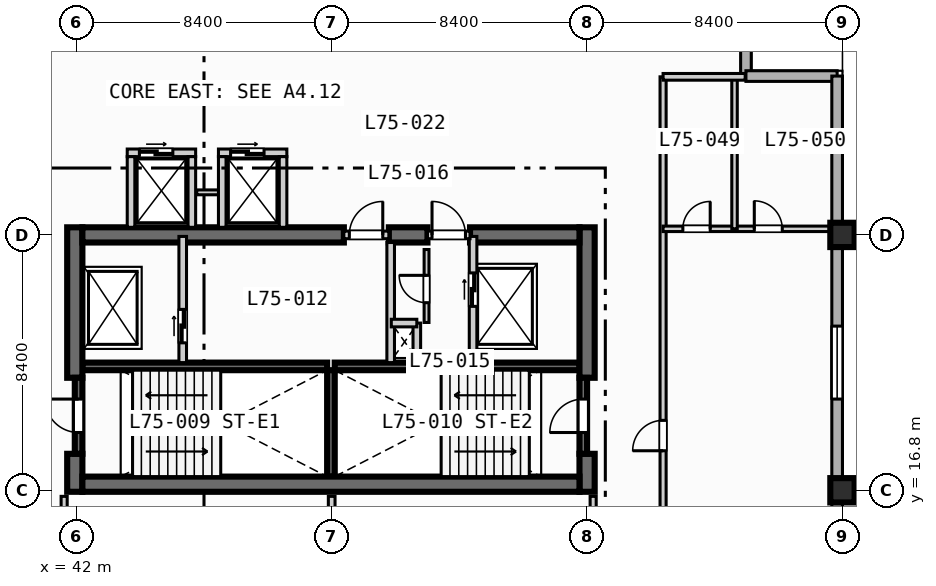
"""IFC4 building model, lengths in metres.
Left out: names, types, materials, properties, quantities, classifications, styles, units other than length and angle.
Written with IfcOpenShell. Run it as: python <this file> out.ifc"""

import sys

from ifc_helpers import new_model, si_unit, direction, frame, frame_2d, origin, origin_2d, place, context, subcontext, project, spatial, rectangle, extrude, element, fill, save


model = new_model("IFC4")
c1 = context("Model", 3, precision=1e-05, world=origin(), true_north=direction((0.0, 1.0)))
c2 = subcontext(c1, "Body", "Model", "MODEL_VIEW")
j1 = project(units=[si_unit("LENGTHUNIT", "METRE"), si_unit("PLANEANGLEUNIT", "RADIAN")], contexts=[c1])
p1 = place(None, origin())
s1 = spatial("IfcSite", under=j1, at=p1, CompositionType="ELEMENT")
p2 = place(p1, origin())
s2 = spatial("IfcBuilding", under=s1, at=p2, CompositionType="ELEMENT")
p3 = place(p2, frame((0.0, 0.0, 304.7)))
s3 = spatial("IfcBuildingStorey", under=s2, at=p3, CompositionType="ELEMENT", Elevation=304.7)
for number, where, z_axis, x_axis in (
    (1, (42.2, 20.875, 0.0), (0.0, 0.0, 1.0), (1.0, 0.0, 0.0)),
    (2, (50.5, 20.875, 0.0), (0.0, 0.0, 1.0), (1.0, 0.0, 0.0)),
):
    element("IfcWall", number, at=place(p3, frame(where, z_axis=z_axis, x_axis=x_axis)), inside=s3, PredefinedType="SOLIDWALL", context=c2, shape_type="SweptSolid", body=[
        extrude(rectangle(XDim=8.05, YDim=0.25, at=frame_2d((4.025, 0.0))), origin(), (0.0, 0.0, 1.0), 3.67),
    ])
p4 = place(p3, frame((50.375, 17.25, 0.0), z_axis=(0.0, 0.0, 1.0), x_axis=(0.0, 1.0, 0.0)))
e3 = element("IfcWall", 3, at=p4, inside=s3, PredefinedType="SOLIDWALL", context=c2, shape_type="SweptSolid", body=[
    extrude(rectangle(XDim=3.5, YDim=0.25, at=frame_2d((1.75, 0.0))), origin(), (0.0, 0.0, 1.0), 3.67),
])
p5 = place(p3, frame((41.95, 16.75, 0.0), z_axis=(0.0, 0.0, 1.0), x_axis=(0.0, 1.0, 0.0)))
e4 = element("IfcWall", 4, at=p5, inside=s3, PredefinedType="SHEAR", context=c2, shape_type="SweptSolid", body=[
    extrude(rectangle(XDim=1.25, YDim=0.5, at=frame_2d((0.625, 0.0))), origin(), (0.0, 0.0, 1.0), 3.67),
])
p6 = place(p3, frame((41.95, 20.5, 0.0), z_axis=(0.0, 0.0, 1.0), x_axis=(0.0, 1.0, 0.0)))
e5 = element("IfcWall", 5, at=p6, inside=s3, PredefinedType="SHEAR", context=c2, shape_type="SweptSolid", body=[
    extrude(rectangle(XDim=4.95, YDim=0.5, at=frame_2d((2.475, 0.0))), origin(), (0.0, 0.0, 1.0), 3.67),
])
p7 = place(p3, frame((58.8, 16.75, 0.0), z_axis=(0.0, 0.0, 1.0), x_axis=(0.0, 1.0, 0.0)))
e6 = element("IfcWall", 6, at=p7, inside=s3, PredefinedType="SHEAR", context=c2, shape_type="SweptSolid", body=[
    extrude(rectangle(XDim=1.25, YDim=0.5, at=frame_2d((0.625, 0.0))), origin(), (0.0, 0.0, 1.0), 3.67),
])
p8 = place(p3, frame((58.8, 20.5, 0.0), z_axis=(0.0, 0.0, 1.0), x_axis=(0.0, 1.0, 0.0)))
e7 = element("IfcWall", 7, at=p8, inside=s3, PredefinedType="SHEAR", context=c2, shape_type="SweptSolid", body=[
    extrude(rectangle(XDim=4.95, YDim=0.5, at=frame_2d((2.475, 0.0))), origin(), (0.0, 0.0, 1.0), 3.67),
])
p9 = place(p3, frame((42.2, 17.0, 0.0), z_axis=(0.0, 0.0, 1.0), x_axis=(1.0, 0.0, 0.0)))
e8 = element("IfcWall", 8, at=p9, inside=s3, PredefinedType="SHEAR", context=c2, shape_type="SweptSolid", body=[
    extrude(rectangle(XDim=16.35, YDim=0.5, at=frame_2d((8.175, 0.0))), origin(), (0.0, 0.0, 1.0), 3.67),
])
p10 = place(p3, frame((42.2, 25.2, 0.0), z_axis=(0.0, 0.0, 1.0), x_axis=(1.0, 0.0, 0.0)))
e9 = element("IfcWall", 9, at=p10, inside=s3, PredefinedType="SHEAR", context=c2, shape_type="SweptSolid", body=[
    extrude(rectangle(XDim=8.6, YDim=0.5, at=frame_2d((4.3, 0.0))), origin(), (0.0, 0.0, 1.0), 3.67),
])
p11 = place(p3, frame((52.28, 25.2, 0.0), z_axis=(0.0, 0.0, 1.0), x_axis=(1.0, 0.0, 0.0)))
e10 = element("IfcWall", 10, at=p11, inside=s3, PredefinedType="SHEAR", context=c2, shape_type="SweptSolid", body=[
    extrude(rectangle(XDim=1.27, YDim=0.5, at=frame_2d((0.635, 0.0))), origin(), (0.0, 0.0, 1.0), 3.67),
])
p12 = place(p3, frame((54.95, 25.2, 0.0), z_axis=(0.0, 0.0, 1.0), x_axis=(1.0, 0.0, 0.0)))
e11 = element("IfcWall", 11, at=p12, inside=s3, PredefinedType="SHEAR", context=c2, shape_type="SweptSolid", body=[
    extrude(rectangle(XDim=3.6, YDim=0.5, at=frame_2d((1.8, 0.0))), origin(), (0.0, 0.0, 1.0), 3.67),
])
for number, where, z_axis, x_axis in (
    (12, (67.2, 16.8, 0.0), (0.0, 0.0, 1.0), (1.0, 0.0, 0.0)),
    (13, (67.2, 25.2, 0.0), (0.0, 0.0, 1.0), (1.0, 0.0, 0.0)),
):
    element("IfcColumn", number, at=place(p3, frame(where, z_axis=z_axis, x_axis=x_axis)), inside=s3, PredefinedType="COLUMN", context=c2, shape_type="SweptSolid", body=[
        extrude(rectangle(XDim=0.8, YDim=0.8, at=origin_2d()), origin(), (0.0, 0.0, 1.0), 3.9),
    ])
for number, where, z_axis, x_axis in (
    (14, (64.025, 33.425, 0.0), (0.0, 0.0, 1.0), (0.0, -1.0, 0.0)),
    (15, (64.025, 30.425, 0.0), (0.0, 0.0, 1.0), (1.0, 0.0, 0.0)),
):
    element("IfcWall", number, at=place(p3, frame(where, z_axis=z_axis, x_axis=x_axis)), inside=s3, PredefinedType="STANDARD", context=c2, shape_type="SweptSolid", body=[
        extrude(rectangle(XDim=3.0, YDim=0.35, at=frame_2d((1.5, 0.0))), origin(), (0.0, 0.0, 1.0), 3.67),
    ])
p13 = place(p3, frame((67.025, 30.425, 0.0), z_axis=(0.0, 0.0, 1.0), x_axis=(0.0, -1.0, 0.0)))
e16 = element("IfcWall", 16, at=p13, inside=s3, PredefinedType="STANDARD", context=c2, shape_type="SweptSolid", body=[
    extrude(rectangle(XDim=18.85, YDim=0.35, at=frame_2d((9.425, 0.0))), origin(), (0.0, 0.0, 1.0), 3.67),
])
p14 = place(p13, frame((8.225, 0.0, 0.85)))
e17 = element("IfcOpeningElement", 17, at=p14, cuts=e16, PredefinedType="OPENING", context=c2, shape_type="SweptSolid", body=[
    extrude(rectangle(XDim=2.4, YDim=1.95, at=frame_2d((1.2, 0.975))), frame((0.0, 0.185, 0.0), z_axis=(0.0, -1.0, 0.0), x_axis=(1.0, 0.0, 0.0)), (0.0, 0.0, 1.0), 0.37),
])
p15 = place(p3, frame((42.075, 18.0, 0.0), z_axis=(0.0, 0.0, 1.0), x_axis=(0.0, 1.0, 0.0)))
e18 = element("IfcWall", 18, at=p15, inside=s3, PredefinedType="SOLIDWALL", context=c2, shape_type="SweptSolid", body=[
    extrude(rectangle(XDim=2.5, YDim=0.25, at=frame_2d((1.25, 0.0))), origin(), (0.0, 0.0, 1.0), 3.67),
])
p16 = place(p15, frame((0.7, 0.0, 0.0)))
e19 = element("IfcOpeningElement", 19, at=p16, cuts=e18, PredefinedType="OPENING", context=c2, shape_type="SweptSolid", body=[
    extrude(rectangle(XDim=1.1, YDim=2.15, at=frame_2d((0.55, 1.075))), frame((0.0, 0.135, 0.0), z_axis=(0.0, -1.0, 0.0), x_axis=(1.0, 0.0, 0.0)), (0.0, 0.0, 1.0), 0.27),
])
p17 = place(p3, frame((58.675, 18.0, 0.0), z_axis=(0.0, 0.0, 1.0), x_axis=(0.0, 1.0, 0.0)))
e20 = element("IfcWall", 20, at=p17, inside=s3, PredefinedType="SOLIDWALL", context=c2, shape_type="SweptSolid", body=[
    extrude(rectangle(XDim=2.5, YDim=0.25, at=frame_2d((1.25, 0.0))), origin(), (0.0, 0.0, 1.0), 3.67),
])
p18 = place(p17, frame((0.7, 0.0, 0.0)))
e21 = element("IfcOpeningElement", 21, at=p18, cuts=e20, PredefinedType="OPENING", context=c2, shape_type="SweptSolid", body=[
    extrude(rectangle(XDim=1.1, YDim=2.15, at=frame_2d((0.55, 1.075))), frame((0.0, 0.135, 0.0), z_axis=(0.0, -1.0, 0.0), x_axis=(1.0, 0.0, 0.0)), (0.0, 0.0, 1.0), 0.27),
])
p19 = place(p3, frame((45.5, 21.0, 0.0), z_axis=(0.0, 0.0, 1.0), x_axis=(0.0, 1.0, 0.0)))
e22 = element("IfcWall", 22, at=p19, inside=s3, PredefinedType="SOLIDWALL", context=c2, shape_type="SweptSolid", body=[
    extrude(rectangle(XDim=4.15, YDim=0.25, at=frame_2d((2.075, 0.0))), origin(), (0.0, 0.0, 1.0), 3.67),
])
p20 = place(p19, frame((0.65, 0.0, 0.0)))
e23 = element("IfcOpeningElement", 23, at=p20, cuts=e22, PredefinedType="OPENING", context=c2, shape_type="SweptSolid", body=[
    extrude(rectangle(XDim=1.1, YDim=2.15, at=frame_2d((0.55, 1.075))), frame((0.0, 0.135, 0.0), z_axis=(0.0, -1.0, 0.0), x_axis=(1.0, 0.0, 0.0)), (0.0, 0.0, 1.0), 0.27),
])
p21 = place(p3, frame((50.8, 25.2, 0.0), z_axis=(0.0, 0.0, 1.0), x_axis=(1.0, 0.0, 0.0)))
e24 = element("IfcWall", 24, at=p21, inside=s3, PredefinedType="SOLIDWALL", context=c2, shape_type="SweptSolid", body=[
    extrude(rectangle(XDim=1.48, YDim=0.25, at=frame_2d((0.74, 0.0))), origin(), (0.0, 0.0, 1.0), 3.67),
])
p22 = place(p21, frame((0.18, 0.0, 0.0)))
e25 = element("IfcOpeningElement", 25, at=p22, cuts=e24, PredefinedType="OPENING", context=c2, shape_type="SweptSolid", body=[
    extrude(rectangle(XDim=1.1, YDim=2.15, at=frame_2d((0.55, 1.075))), frame((0.0, 0.135, 0.0), z_axis=(0.0, -1.0, 0.0), x_axis=(1.0, 0.0, 0.0)), (0.0, 0.0, 1.0), 0.27),
])
p23 = place(p3, frame((52.34, 21.0, 0.0), z_axis=(0.0, 0.0, 1.0), x_axis=(0.0, 1.0, 0.0)))
e26 = element("IfcWall", 26, at=p23, inside=s3, PredefinedType="SOLIDWALL", context=c2, shape_type="SweptSolid", body=[
    extrude(rectangle(XDim=3.95, YDim=0.25, at=frame_2d((1.975, 0.0))), origin(), (0.0, 0.0, 1.0), 3.67),
])
p24 = place(p3, frame((55.05, 21.0, 0.0), z_axis=(0.0, 0.0, 1.0), x_axis=(0.0, 1.0, 0.0)))
e27 = element("IfcWall", 27, at=p24, inside=s3, PredefinedType="SOLIDWALL", context=c2, shape_type="SweptSolid", body=[
    extrude(rectangle(XDim=4.15, YDim=0.25, at=frame_2d((2.075, 0.0))), origin(), (0.0, 0.0, 1.0), 3.67),
])
p25 = place(p24, frame((1.85, 0.0, 0.0)))
e28 = element("IfcOpeningElement", 28, at=p25, cuts=e27, PredefinedType="OPENING", context=c2, shape_type="SweptSolid", body=[
    extrude(rectangle(XDim=1.1, YDim=2.15, at=frame_2d((0.55, 1.075))), frame((0.0, 0.135, 0.0), z_axis=(0.0, -1.0, 0.0), x_axis=(1.0, 0.0, 0.0)), (0.0, 0.0, 1.0), 0.27),
])
p26 = place(p3, frame((53.55, 25.2, 0.0), z_axis=(0.0, 0.0, 1.0), x_axis=(1.0, 0.0, 0.0)))
e29 = element("IfcWall", 29, at=p26, inside=s3, PredefinedType="SOLIDWALL", context=c2, shape_type="SweptSolid", body=[
    extrude(rectangle(XDim=1.4, YDim=0.25, at=frame_2d((0.7, 0.0))), origin(), (0.0, 0.0, 1.0), 3.67),
])
p27 = place(p26, frame((0.15, 0.0, 0.0)))
e30 = element("IfcOpeningElement", 30, at=p27, cuts=e29, PredefinedType="OPENING", context=c2, shape_type="SweptSolid", body=[
    extrude(rectangle(XDim=1.1, YDim=2.15, at=frame_2d((0.55, 1.075))), frame((0.0, 0.135, 0.0), z_axis=(0.0, -1.0, 0.0), x_axis=(1.0, 0.0, 0.0)), (0.0, 0.0, 1.0), 0.27),
])
p28 = place(p3, frame((53.2, 21.0, 0.0), z_axis=(0.0, 0.0, 1.0), x_axis=(0.0, 1.0, 0.0)))
e31 = element("IfcWall", 31, at=p28, inside=s3, PredefinedType="SOLIDWALL", context=c2, shape_type="SweptSolid", body=[
    extrude(rectangle(XDim=1.3, YDim=0.25, at=frame_2d((0.65, 0.0))), origin(), (0.0, 0.0, 1.0), 3.67),
])
p29 = place(p3, frame((52.36, 22.3, 0.0), z_axis=(0.0, 0.0, 1.0), x_axis=(1.0, 0.0, 0.0)))
e32 = element("IfcWall", 32, at=p29, inside=s3, PredefinedType="SOLIDWALL", context=c2, shape_type="SweptSolid", body=[
    extrude(rectangle(XDim=0.84, YDim=0.25, at=frame_2d((0.42, 0.0))), origin(), (0.0, 0.0, 1.0), 3.67),
])
p30 = place(p3, frame((53.52, 22.32, 0.0), z_axis=(0.0, 0.0, 1.0), x_axis=(0.0, 1.0, 0.0)))
e33 = element("IfcWall", 33, at=p30, inside=s3, PredefinedType="PARTITIONING", context=c2, shape_type="SweptSolid", body=[
    extrude(rectangle(XDim=2.4, YDim=0.16, at=frame_2d((1.2, 0.0))), origin(), (0.0, 0.0, 1.0), 3.67),
])
p31 = place(p30, frame((0.65, 0.0, 0.0)))
e34 = element("IfcOpeningElement", 34, at=p31, cuts=e33, PredefinedType="OPENING", context=c2, shape_type="SweptSolid", body=[
    extrude(rectangle(XDim=0.9, YDim=2.1, at=frame_2d((0.45, 1.05))), frame((0.0, 0.09, 0.0), z_axis=(0.0, -1.0, 0.0), x_axis=(1.0, 0.0, 0.0)), (0.0, 0.0, 1.0), 0.18),
])
p32 = place(p3, frame((43.675, 27.9, 0.0), z_axis=(0.0, 0.0, 1.0), x_axis=(1.0, 0.0, 0.0)))
e35 = element("IfcWall", 35, at=p32, inside=s3, PredefinedType="SOLIDWALL", context=c2, shape_type="SweptSolid", body=[
    extrude(rectangle(XDim=2.25, YDim=0.25, at=frame_2d((1.125, 0.0))), origin(), (0.0, 0.0, 1.0), 3.67),
])
p33 = place(p32, frame((0.4, 0.0, 0.0)))
e36 = element("IfcOpeningElement", 36, at=p33, cuts=e35, PredefinedType="OPENING", context=c2, shape_type="SweptSolid", body=[
    extrude(rectangle(XDim=1.1, YDim=2.15, at=frame_2d((0.55, 1.075))), frame((0.0, 0.135, 0.0), z_axis=(0.0, -1.0, 0.0), x_axis=(1.0, 0.0, 0.0)), (0.0, 0.0, 1.0), 0.27),
])
for number, where, z_axis, x_axis in (
    (37, (43.8, 25.45, 0.0), (0.0, 0.0, 1.0), (0.0, 1.0, 0.0)),
    (38, (45.8, 25.45, 0.0), (0.0, 0.0, 1.0), (0.0, 1.0, 0.0)),
):
    element("IfcWall", number, at=place(p3, frame(where, z_axis=z_axis, x_axis=x_axis)), inside=s3, PredefinedType="SOLIDWALL", context=c2, shape_type="SweptSolid", body=[
        extrude(rectangle(XDim=2.325, YDim=0.25, at=frame_2d((1.163, 0.0))), origin(), (0.0, 0.0, 1.0), 3.67),
    ])
p34 = place(p3, frame((45.96, 26.6, 0.0), z_axis=(0.0, 0.0, 1.0), x_axis=(1.0, 0.0, 0.0)))
e39 = element("IfcWall", 39, at=p34, inside=s3, PredefinedType="PARTITIONING", context=c2, shape_type="SweptSolid", body=[
    extrude(rectangle(XDim=0.88, YDim=0.16, at=frame_2d((0.44, 0.0))), origin(), (0.0, 0.0, 1.0), 3.67),
])
p35 = place(p3, frame((46.675, 27.9, 0.0), z_axis=(0.0, 0.0, 1.0), x_axis=(1.0, 0.0, 0.0)))
e40 = element("IfcWall", 40, at=p35, inside=s3, PredefinedType="SOLIDWALL", context=c2, shape_type="SweptSolid", body=[
    extrude(rectangle(XDim=2.25, YDim=0.25, at=frame_2d((1.125, 0.0))), origin(), (0.0, 0.0, 1.0), 3.67),
])
p36 = place(p35, frame((0.4, 0.0, 0.0)))
e41 = element("IfcOpeningElement", 41, at=p36, cuts=e40, PredefinedType="OPENING", context=c2, shape_type="SweptSolid", body=[
    extrude(rectangle(XDim=1.1, YDim=2.15, at=frame_2d((0.55, 1.075))), frame((0.0, 0.135, 0.0), z_axis=(0.0, -1.0, 0.0), x_axis=(1.0, 0.0, 0.0)), (0.0, 0.0, 1.0), 0.27),
])
for number, where, z_axis, x_axis in (
    (42, (46.8, 25.45, 0.0), (0.0, 0.0, 1.0), (0.0, 1.0, 0.0)),
    (43, (48.8, 25.45, 0.0), (0.0, 0.0, 1.0), (0.0, 1.0, 0.0)),
):
    element("IfcWall", number, at=place(p3, frame(where, z_axis=z_axis, x_axis=x_axis)), inside=s3, PredefinedType="SOLIDWALL", context=c2, shape_type="SweptSolid", body=[
        extrude(rectangle(XDim=2.325, YDim=0.25, at=frame_2d((1.163, 0.0))), origin(), (0.0, 0.0, 1.0), 3.67),
    ])
p37 = place(p3, frame((41.6, 8.65, 0.0), z_axis=(0.0, 0.0, 1.0), x_axis=(0.0, 1.0, 0.0)))
e44 = element("IfcWall", 44, at=p37, inside=s3, PredefinedType="PARTITIONING", context=c2, shape_type="SweptSolid", body=[
    extrude(rectangle(XDim=7.95, YDim=0.2, at=frame_2d((3.975, 0.0))), origin(), (0.0, 0.0, 1.0), 3.67),
])
p38 = place(p37, frame((2.2, 0.0, 0.0)))
e45 = element("IfcOpeningElement", 45, at=p38, cuts=e44, PredefinedType="OPENING", context=c2, shape_type="SweptSolid", body=[
    extrude(rectangle(XDim=0.92, YDim=2.1, at=frame_2d((0.46, 1.05))), frame((0.0, 0.11, 0.0), z_axis=(0.0, -1.0, 0.0), x_axis=(1.0, 0.0, 0.0)), (0.0, 0.0, 1.0), 0.22),
])
p39 = place(p3, frame((59.0, 8.65, 0.0), z_axis=(0.0, 0.0, 1.0), x_axis=(0.0, 1.0, 0.0)))
e46 = element("IfcWall", 46, at=p39, inside=s3, PredefinedType="PARTITIONING", context=c2, shape_type="SweptSolid", body=[
    extrude(rectangle(XDim=7.95, YDim=0.2, at=frame_2d((3.975, 0.0))), origin(), (0.0, 0.0, 1.0), 3.07),
])
p40 = place(p39, frame((2.2, 0.0, 0.0)))
e47 = element("IfcOpeningElement", 47, at=p40, cuts=e46, PredefinedType="OPENING", context=c2, shape_type="SweptSolid", body=[
    extrude(rectangle(XDim=0.92, YDim=2.1, at=frame_2d((0.46, 1.05))), frame((0.0, 0.11, 0.0), z_axis=(0.0, -1.0, 0.0), x_axis=(1.0, 0.0, 0.0)), (0.0, 0.0, 1.0), 0.22),
])
p41 = place(p3, frame((50.4, 8.65, 0.0), z_axis=(0.0, 0.0, 1.0), x_axis=(0.0, 1.0, 0.0)))
e48 = element("IfcWall", 48, at=p41, inside=s3, PredefinedType="PARTITIONING", context=c2, shape_type="SweptSolid", body=[
    extrude(rectangle(XDim=7.95, YDim=0.22, at=frame_2d((3.975, 0.0))), origin(), (0.0, 0.0, 1.0), 3.127),
])
p42 = place(p3, frame((61.3, 11.6, 0.0), z_axis=(0.0, 0.0, 1.0), x_axis=(0.0, 1.0, 0.0)))
e49 = element("IfcWall", 49, at=p42, inside=s3, PredefinedType="PARTITIONING", context=c2, shape_type="SweptSolid", body=[
    extrude(rectangle(XDim=18.8, YDim=0.2, at=frame_2d((9.4, 0.0))), origin(), (0.0, 0.0, 1.0), 3.67),
])
p43 = place(p42, frame((6.5, 0.0, 0.0)))
e50 = element("IfcOpeningElement", 50, at=p43, cuts=e49, PredefinedType="OPENING", context=c2, shape_type="SweptSolid", body=[
    extrude(rectangle(XDim=1.0, YDim=2.15, at=frame_2d((0.5, 1.075))), frame((0.0, 0.11, 0.0), z_axis=(0.0, -1.0, 0.0), x_axis=(1.0, 0.0, 0.0)), (0.0, 0.0, 1.0), 0.22),
])
p44 = place(p3, frame((61.3, 25.4, 0.0), z_axis=(0.0, 0.0, 1.0), x_axis=(1.0, 0.0, 0.0)))
e51 = element("IfcWall", 51, at=p44, inside=s3, PredefinedType="PLUMBINGWALL", context=c2, shape_type="SweptSolid", body=[
    extrude(rectangle(XDim=5.5, YDim=0.18, at=frame_2d((2.75, 0.0))), origin(), (0.0, 0.0, 1.0), 3.127),
])
p45 = place(p44, frame((0.65, 0.0, 0.0)))
e52 = element("IfcOpeningElement", 52, at=p45, cuts=e51, PredefinedType="OPENING", context=c2, shape_type="SweptSolid", body=[
    extrude(rectangle(XDim=0.9, YDim=2.1, at=frame_2d((0.45, 1.05))), frame((0.0, 0.1, 0.0), z_axis=(0.0, -1.0, 0.0), x_axis=(1.0, 0.0, 0.0)), (0.0, 0.0, 1.0), 0.2),
])
p46 = place(p44, frame((3.0, 0.0, 0.0)))
e53 = element("IfcOpeningElement", 53, at=p46, cuts=e51, PredefinedType="OPENING", context=c2, shape_type="SweptSolid", body=[
    extrude(rectangle(XDim=0.92, YDim=2.1, at=frame_2d((0.46, 1.05))), frame((0.0, 0.1, 0.0), z_axis=(0.0, -1.0, 0.0), x_axis=(1.0, 0.0, 0.0)), (0.0, 0.0, 1.0), 0.2),
])
p47 = place(p3, frame((63.65, 25.4, 0.0), z_axis=(0.0, 0.0, 1.0), x_axis=(0.0, 1.0, 0.0)))
e54 = element("IfcWall", 54, at=p47, inside=s3, PredefinedType="PLUMBINGWALL", context=c2, shape_type="SweptSolid", body=[
    extrude(rectangle(XDim=5.0, YDim=0.18, at=frame_2d((2.5, 0.0))), origin(), (0.0, 0.0, 1.0), 3.67),
])
p48 = place(p3, frame((61.3, 30.4, 0.0), z_axis=(0.0, 0.0, 1.0), x_axis=(1.0, 0.0, 0.0)))
e55 = element("IfcWall", 55, at=p48, inside=s3, PredefinedType="PARTITIONING", context=c2, shape_type="SweptSolid", body=[
    extrude(rectangle(XDim=2.7, YDim=0.22, at=frame_2d((1.35, 0.0))), origin(), (0.0, 0.0, 1.0), 3.67),
])
p49 = place(p14, origin())
e56 = element("IfcWindow", 56, at=p49, inside=s3, PartitioningType="SINGLE_PANEL", PredefinedType="WINDOW", context=c2, shape_type="SweptSolid", body=[
    extrude(rectangle(XDim=2.4, YDim=1.95, at=frame_2d((1.2, 0.975))), frame((0.0, 0.03, 0.0), z_axis=(0.0, -1.0, 0.0), x_axis=(1.0, 0.0, 0.0)), (0.0, 0.0, 1.0), 0.06),
])
fill(e17, e56)
p50 = place(p16, origin())
e57 = element("IfcDoor", 57, at=p50, inside=s3, OperationType="SINGLE_SWING_RIGHT", PredefinedType="DOOR", context=c2, shape_type="SweptSolid", body=[
    extrude(rectangle(XDim=1.1, YDim=2.15, at=frame_2d((0.55, 1.075))), frame((0.0, 0.025, 0.0), z_axis=(0.0, -1.0, 0.0), x_axis=(1.0, 0.0, 0.0)), (0.0, 0.0, 1.0), 0.05),
])
fill(e19, e57)
p51 = place(p18, origin())
e58 = element("IfcDoor", 58, at=p51, inside=s3, OperationType="SINGLE_SWING_LEFT", PredefinedType="DOOR", context=c2, shape_type="SweptSolid", body=[
    extrude(rectangle(XDim=1.1, YDim=2.15, at=frame_2d((0.55, 1.075))), frame((0.0, 0.025, 0.0), z_axis=(0.0, -1.0, 0.0), x_axis=(1.0, 0.0, 0.0)), (0.0, 0.0, 1.0), 0.05),
])
fill(e21, e58)
p52 = place(p20, origin())
e59 = element("IfcDoor", 59, at=p52, inside=s3, OperationType="SLIDING_TO_LEFT", PredefinedType="DOOR", context=c2, shape_type="SweptSolid", body=[
    extrude(rectangle(XDim=1.1, YDim=2.15, at=frame_2d((0.55, 1.075))), frame((0.0, 0.025, 0.0), z_axis=(0.0, -1.0, 0.0), x_axis=(1.0, 0.0, 0.0)), (0.0, 0.0, 1.0), 0.05),
])
fill(e23, e59)
p53 = place(p22, origin())
e60 = element("IfcDoor", 60, at=p53, inside=s3, OperationType="SINGLE_SWING_RIGHT", PredefinedType="DOOR", context=c2, shape_type="SweptSolid", body=[
    extrude(rectangle(XDim=1.1, YDim=2.15, at=frame_2d((0.55, 1.075))), frame((0.0, 0.025, 0.0), z_axis=(0.0, -1.0, 0.0), x_axis=(1.0, 0.0, 0.0)), (0.0, 0.0, 1.0), 0.05),
])
fill(e25, e60)
p54 = place(p25, origin())
e61 = element("IfcDoor", 61, at=p54, inside=s3, OperationType="SLIDING_TO_LEFT", PredefinedType="DOOR", context=c2, shape_type="SweptSolid", body=[
    extrude(rectangle(XDim=1.1, YDim=2.15, at=frame_2d((0.55, 1.075))), frame((0.0, 0.025, 0.0), z_axis=(0.0, -1.0, 0.0), x_axis=(1.0, 0.0, 0.0)), (0.0, 0.0, 1.0), 0.05),
])
fill(e28, e61)
p55 = place(p27, origin())
e62 = element("IfcDoor", 62, at=p55, inside=s3, OperationType="SINGLE_SWING_LEFT", PredefinedType="DOOR", context=c2, shape_type="SweptSolid", body=[
    extrude(rectangle(XDim=1.1, YDim=2.15, at=frame_2d((0.55, 1.075))), frame((0.0, 0.025, 0.0), z_axis=(0.0, -1.0, 0.0), x_axis=(1.0, 0.0, 0.0)), (0.0, 0.0, 1.0), 0.05),
])
fill(e30, e62)
p56 = place(p31, origin())
e63 = element("IfcDoor", 63, at=p56, inside=s3, OperationType="SINGLE_SWING_RIGHT", PredefinedType="DOOR", context=c2, shape_type="SweptSolid", body=[
    extrude(rectangle(XDim=0.9, YDim=2.1, at=frame_2d((0.45, 1.05))), frame((0.0, 0.025, 0.0), z_axis=(0.0, -1.0, 0.0), x_axis=(1.0, 0.0, 0.0)), (0.0, 0.0, 1.0), 0.05),
])
fill(e34, e63)
p57 = place(p33, origin())
e64 = element("IfcDoor", 64, at=p57, inside=s3, OperationType="SLIDING_TO_LEFT", PredefinedType="DOOR", context=c2, shape_type="SweptSolid", body=[
    extrude(rectangle(XDim=1.1, YDim=2.15, at=frame_2d((0.55, 1.075))), frame((0.0, 0.025, 0.0), z_axis=(0.0, -1.0, 0.0), x_axis=(1.0, 0.0, 0.0)), (0.0, 0.0, 1.0), 0.05),
])
fill(e36, e64)
p58 = place(p36, origin())
e65 = element("IfcDoor", 65, at=p58, inside=s3, OperationType="SLIDING_TO_LEFT", PredefinedType="DOOR", context=c2, shape_type="SweptSolid", body=[
    extrude(rectangle(XDim=1.1, YDim=2.15, at=frame_2d((0.55, 1.075))), frame((0.0, 0.025, 0.0), z_axis=(0.0, -1.0, 0.0), x_axis=(1.0, 0.0, 0.0)), (0.0, 0.0, 1.0), 0.05),
])
fill(e41, e65)
p59 = place(p43, origin())
e66 = element("IfcDoor", 66, at=p59, inside=s3, OperationType="SINGLE_SWING_LEFT", PredefinedType="DOOR", context=c2, shape_type="SweptSolid", body=[
    extrude(rectangle(XDim=1.0, YDim=2.15, at=frame_2d((0.5, 1.075))), frame((0.0, 0.025, 0.0), z_axis=(0.0, -1.0, 0.0), x_axis=(1.0, 0.0, 0.0)), (0.0, 0.0, 1.0), 0.05),
])
fill(e50, e66)
p60 = place(p45, origin())
e67 = element("IfcDoor", 67, at=p60, inside=s3, OperationType="SINGLE_SWING_RIGHT", PredefinedType="DOOR", context=c2, shape_type="SweptSolid", body=[
    extrude(rectangle(XDim=0.9, YDim=2.1, at=frame_2d((0.45, 1.05))), frame((0.0, 0.025, 0.0), z_axis=(0.0, -1.0, 0.0), x_axis=(1.0, 0.0, 0.0)), (0.0, 0.0, 1.0), 0.05),
])
fill(e52, e67)
p61 = place(p46, origin())
e68 = element("IfcDoor", 68, at=p61, inside=s3, OperationType="SINGLE_SWING_LEFT", PredefinedType="DOOR", context=c2, shape_type="SweptSolid", body=[
    extrude(rectangle(XDim=0.92, YDim=2.1, at=frame_2d((0.46, 1.05))), frame((0.0, 0.025, 0.0), z_axis=(0.0, -1.0, 0.0), x_axis=(1.0, 0.0, 0.0)), (0.0, 0.0, 1.0), 0.05),
])
fill(e53, e68)
save(model, sys.argv[1])
